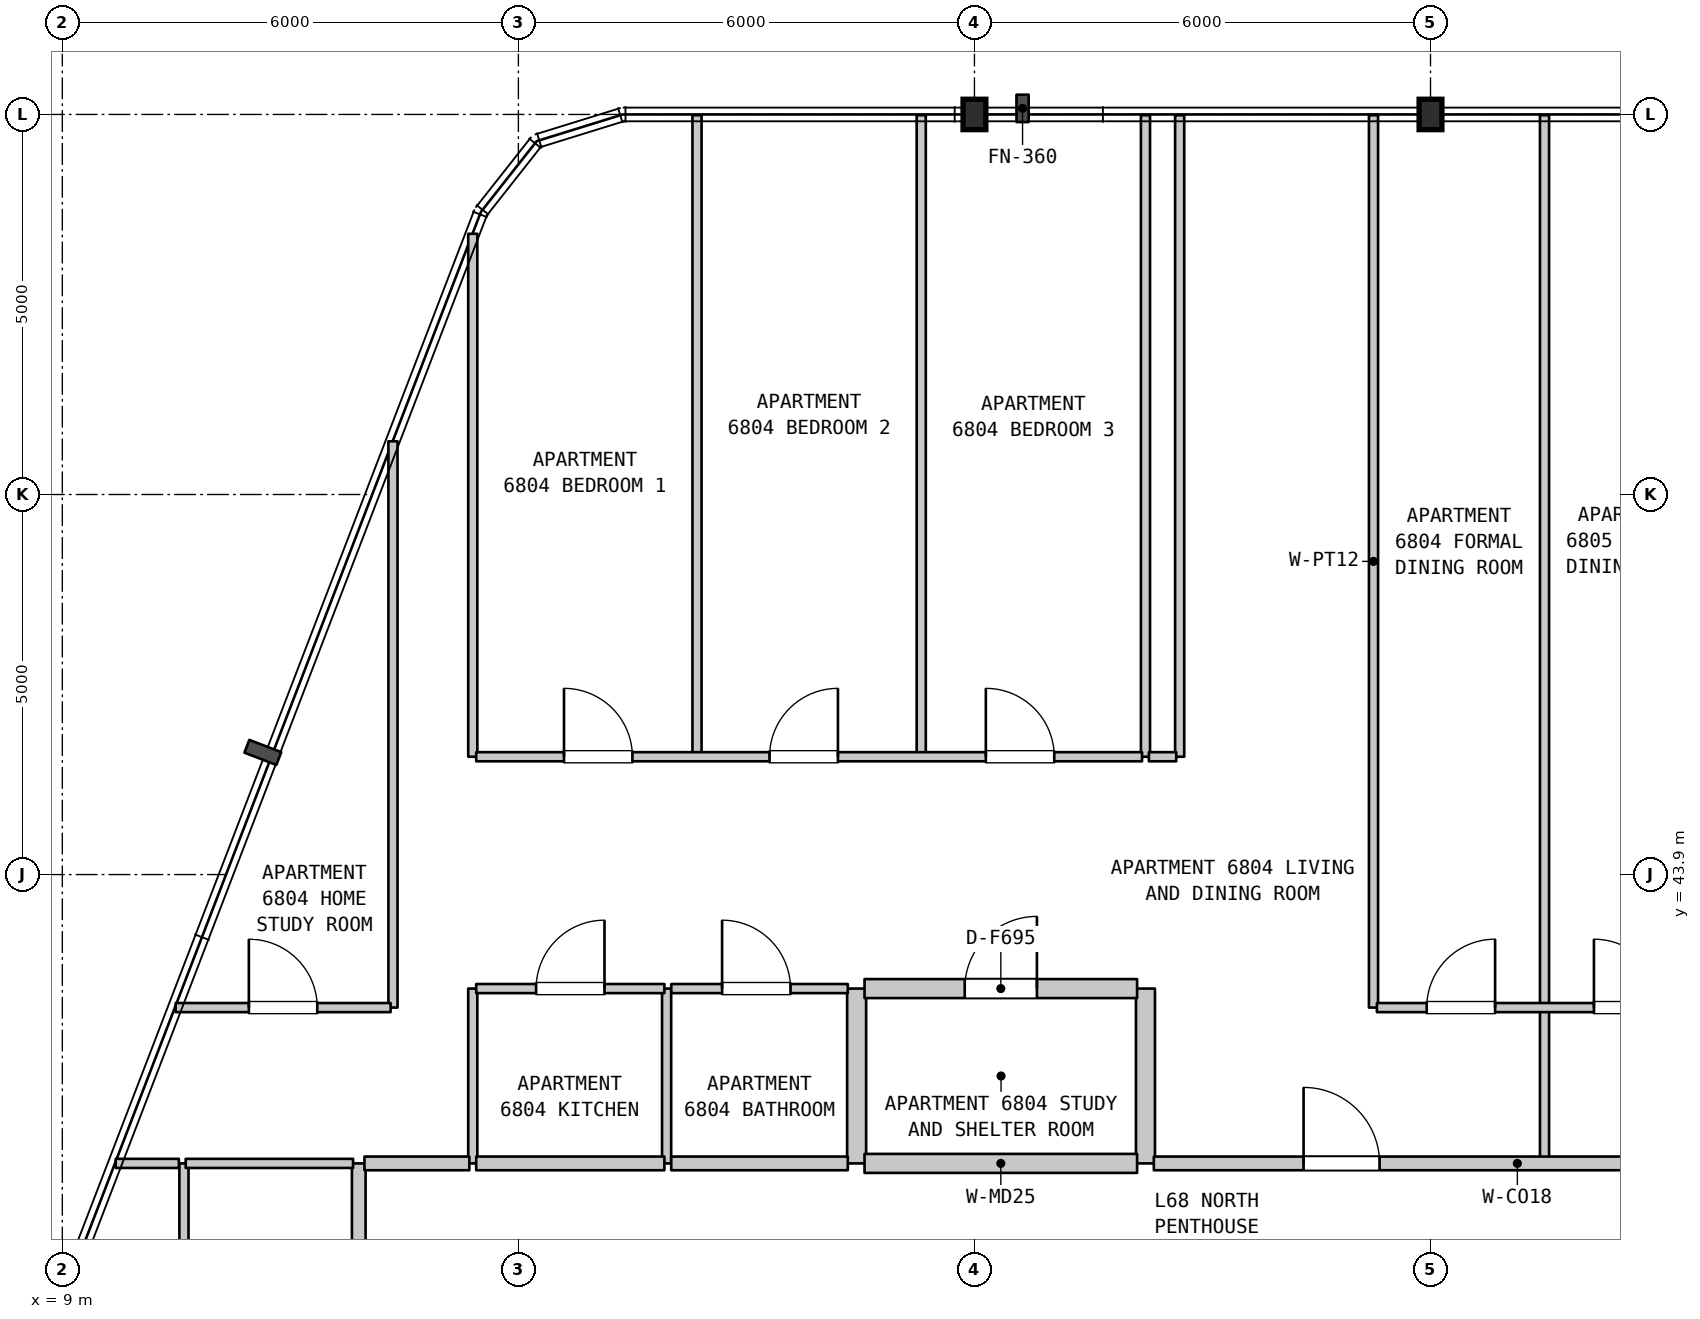
"""IFC4 building model, lengths in metres.
Left out: names, types, materials, properties, quantities, classifications, styles, units other than length and angle.
Written with IfcOpenShell. Run it as: python <this file> out.ifc"""

import sys

from ifc_helpers import new_model, si_unit, direction, frame, frame_2d, origin, origin_2d, place, context, subcontext, project, spatial, rectangle, i_section, extrude, element, fill, save


model = new_model("IFC4")
c1 = context("Model", 3, precision=1e-05, world=origin(), true_north=direction((0.0, 1.0)))
c2 = subcontext(c1, "Body", "Model", "MODEL_VIEW")
j1 = project(units=[si_unit("LENGTHUNIT", "METRE"), si_unit("PLANEANGLEUNIT", "RADIAN")], contexts=[c1])
p1 = place(None, origin())
s1 = spatial("IfcSite", under=j1, at=p1, CompositionType="ELEMENT")
p2 = place(p1, origin())
s2 = spatial("IfcBuilding", under=s1, at=p2, CompositionType="ELEMENT")
p3 = place(p2, frame((0.0, 0.0, 273.2)))
s3 = spatial("IfcBuildingStorey", under=s2, at=p3, CompositionType="ELEMENT", Elevation=273.2)
for number, where, z_axis, x_axis in (
    (1, (21.0, 53.9, 0.0), (0.0, 0.0, 1.0), (1.0, 0.0, 0.0)),
    (2, (27.0, 53.9, 0.0), (0.0, 0.0, 1.0), (1.0, 0.0, 0.0)),
):
    element("IfcColumn", number, at=place(p3, frame(where, z_axis=z_axis, x_axis=x_axis)), inside=s3, PredefinedType="COLUMN", context=c2, shape_type="SweptSolid", body=[
        extrude(i_section(OverallWidth=0.3, OverallDepth=0.4, WebThickness=0.013, FlangeThickness=0.024, FilletRadius=0.027, at=origin_2d()), origin(), (0.0, 0.0, 1.0), 3.7),
    ])
p4 = place(p3, frame((10.6, 33.32, 0.0), z_axis=(0.0, 0.0, 1.0), x_axis=(0.0, 1.0, 0.0)))
e3 = element("IfcWall", 3, at=p4, inside=s3, PredefinedType="PARTITIONING", context=c2, shape_type="SweptSolid", body=[
    extrude(rectangle(XDim=6.78, YDim=0.12, at=frame_2d((3.39, 0.0))), origin(), (0.0, 0.0, 1.0), 3.39),
])
p5 = place(p3, frame((12.9, 33.32, 0.0), z_axis=(0.0, 0.0, 1.0), x_axis=(0.0, 1.0, 0.0)))
e4 = element("IfcWall", 4, at=p5, inside=s3, PredefinedType="STANDARD", context=c2, shape_type="SweptSolid", body=[
    extrude(rectangle(XDim=6.78, YDim=0.18, at=frame_2d((3.39, 0.0))), origin(), (0.0, 0.0, 1.0), 3.39),
])
p6 = place(p3, frame((13.35, 42.15, 0.0), z_axis=(0.0, 0.0, 1.0), x_axis=(0.0, 1.0, 0.0)))
e5 = element("IfcWall", 5, at=p6, inside=s3, PredefinedType="PARTITIONING", context=c2, shape_type="SweptSolid", body=[
    extrude(rectangle(XDim=7.45, YDim=0.12, at=frame_2d((3.725, 0.0))), origin(), (0.0, 0.0, 1.0), 3.39),
])
p7 = place(p3, frame((14.4, 40.1, 0.0), z_axis=(0.0, 0.0, 1.0), x_axis=(0.0, 1.0, 0.0)))
e6 = element("IfcWall", 6, at=p7, inside=s3, PredefinedType="PARTITIONING", context=c2, shape_type="SweptSolid", body=[
    extrude(rectangle(XDim=2.3, YDim=0.12, at=frame_2d((1.15, 0.0))), origin(), (0.0, 0.0, 1.0), 3.39),
])
p8 = place(p3, frame((14.4, 45.45, 0.0), z_axis=(0.0, 0.0, 1.0), x_axis=(0.0, 1.0, 0.0)))
e7 = element("IfcWall", 7, at=p8, inside=s3, PredefinedType="PARTITIONING", context=c2, shape_type="SweptSolid", body=[
    extrude(rectangle(XDim=6.88, YDim=0.12, at=frame_2d((3.44, 0.0))), origin(), (0.0, 0.0, 1.0), 3.39),
])
p9 = place(p3, frame((16.95, 40.1, 0.0), z_axis=(0.0, 0.0, 1.0), x_axis=(0.0, 1.0, 0.0)))
e8 = element("IfcWall", 8, at=p9, inside=s3, PredefinedType="PARTITIONING", context=c2, shape_type="SweptSolid", body=[
    extrude(rectangle(XDim=2.3, YDim=0.12, at=frame_2d((1.15, 0.0))), origin(), (0.0, 0.0, 1.0), 3.39),
])
p10 = place(p3, frame((17.35, 45.45, 0.0), z_axis=(0.0, 0.0, 1.0), x_axis=(0.0, 1.0, 0.0)))
e9 = element("IfcWall", 9, at=p10, inside=s3, PredefinedType="PARTITIONING", context=c2, shape_type="SweptSolid", body=[
    extrude(rectangle(XDim=8.44, YDim=0.12, at=frame_2d((4.22, 0.0))), origin(), (0.0, 0.0, 1.0), 3.39),
])
p11 = place(p3, frame((19.45, 40.1, 0.0), z_axis=(0.0, 0.0, 1.0), x_axis=(0.0, 1.0, 0.0)))
e10 = element("IfcWall", 10, at=p11, inside=s3, PredefinedType="STANDARD", context=c2, shape_type="SweptSolid", body=[
    extrude(rectangle(XDim=2.3, YDim=0.25, at=frame_2d((1.15, 0.0))), origin(), (0.0, 0.0, 1.0), 3.39),
])
p12 = place(p3, frame((20.3, 45.45, 0.0), z_axis=(0.0, 0.0, 1.0), x_axis=(0.0, 1.0, 0.0)))
e11 = element("IfcWall", 11, at=p12, inside=s3, PredefinedType="PARTITIONING", context=c2, shape_type="SweptSolid", body=[
    extrude(rectangle(XDim=8.44, YDim=0.12, at=frame_2d((4.22, 0.0))), origin(), (0.0, 0.0, 1.0), 3.39),
])
p13 = place(p3, frame((23.25, 40.1, 0.0), z_axis=(0.0, 0.0, 1.0), x_axis=(0.0, 1.0, 0.0)))
e12 = element("IfcWall", 12, at=p13, inside=s3, PredefinedType="STANDARD", context=c2, shape_type="SweptSolid", body=[
    extrude(rectangle(XDim=2.3, YDim=0.25, at=frame_2d((1.15, 0.0))), origin(), (0.0, 0.0, 1.0), 3.39),
])
for number, where, z_axis, x_axis in (
    (13, (23.25, 45.45, 0.0), (0.0, 0.0, 1.0), (0.0, 1.0, 0.0)),
    (14, (23.7, 45.45, 0.0), (0.0, 0.0, 1.0), (0.0, 1.0, 0.0)),
):
    element("IfcWall", number, at=place(p3, frame(where, z_axis=z_axis, x_axis=x_axis)), inside=s3, PredefinedType="PARTITIONING", context=c2, shape_type="SweptSolid", body=[
        extrude(rectangle(XDim=8.44, YDim=0.12, at=frame_2d((4.22, 0.0))), origin(), (0.0, 0.0, 1.0), 3.39),
    ])
p14 = place(p3, frame((26.25, 42.15, 0.0), z_axis=(0.0, 0.0, 1.0), x_axis=(0.0, 1.0, 0.0)))
e15 = element("IfcWall", 15, at=p14, inside=s3, PredefinedType="PARTITIONING", context=c2, shape_type="SweptSolid", body=[
    extrude(rectangle(XDim=11.74, YDim=0.12, at=frame_2d((5.87, 0.0))), origin(), (0.0, 0.0, 1.0), 3.39),
])
p15 = place(p3, frame((28.5, 40.1, 0.0), z_axis=(0.0, 0.0, 1.0), x_axis=(0.0, 1.0, 0.0)))
e16 = element("IfcWall", 16, at=p15, inside=s3, PredefinedType="PARTITIONING", context=c2, shape_type="SweptSolid", body=[
    extrude(rectangle(XDim=2.05, YDim=0.12, at=frame_2d((1.025, 0.0))), origin(), (0.0, 0.0, 1.0), 3.39),
])
p16 = place(p3, frame((28.5, 42.15, 0.0), z_axis=(0.0, 0.0, 1.0), x_axis=(0.0, 1.0, 0.0)))
e17 = element("IfcWall", 17, at=p16, inside=s3, PredefinedType="PARTITIONING", context=c2, shape_type="SweptSolid", body=[
    extrude(rectangle(XDim=11.74, YDim=0.12, at=frame_2d((5.87, 0.0))), origin(), (0.0, 0.0, 1.0), 3.39),
])
p17 = place(p3, frame((9.702, 40.1, 0.0), z_axis=(0.0, 0.0, 1.0), x_axis=(1.0, 0.0, 0.0)))
e18 = element("IfcWall", 18, at=p17, inside=s3, PredefinedType="PARTITIONING", context=c2, shape_type="SweptSolid", body=[
    extrude(rectangle(XDim=0.831, YDim=0.12, at=frame_2d((0.416, 0.0))), origin(), (0.0, 0.0, 1.0), 3.39),
])
p18 = place(p3, frame((10.623, 40.1, 0.0), z_axis=(0.0, 0.0, 1.0), x_axis=(1.0, 0.0, 0.0)))
e19 = element("IfcWall", 19, at=p18, inside=s3, PredefinedType="PARTITIONING", context=c2, shape_type="SweptSolid", body=[
    extrude(rectangle(XDim=2.202, YDim=0.12, at=frame_2d((1.101, 0.0))), origin(), (0.0, 0.0, 1.0), 3.39),
])
p19 = place(p3, frame((12.975, 40.1, 0.0), z_axis=(0.0, 0.0, 1.0), x_axis=(1.0, 0.0, 0.0)))
e20 = element("IfcWall", 20, at=p19, inside=s3, PredefinedType="STANDARD", context=c2, shape_type="SweptSolid", body=[
    extrude(rectangle(XDim=1.38, YDim=0.18, at=frame_2d((0.69, 0.0))), origin(), (0.0, 0.0, 1.0), 3.39),
])
p20 = place(p3, frame((14.445, 40.1, 0.0), z_axis=(0.0, 0.0, 1.0), x_axis=(1.0, 0.0, 0.0)))
e21 = element("IfcWall", 21, at=p20, inside=s3, PredefinedType="STANDARD", context=c2, shape_type="SweptSolid", body=[
    extrude(rectangle(XDim=2.476, YDim=0.18, at=frame_2d((1.238, 0.0))), origin(), (0.0, 0.0, 1.0), 3.39),
])
p21 = place(p3, frame((17.011, 40.1, 0.0), z_axis=(0.0, 0.0, 1.0), x_axis=(1.0, 0.0, 0.0)))
e22 = element("IfcWall", 22, at=p21, inside=s3, PredefinedType="STANDARD", context=c2, shape_type="SweptSolid", body=[
    extrude(rectangle(XDim=2.323, YDim=0.18, at=frame_2d((1.162, 0.0))), origin(), (0.0, 0.0, 1.0), 3.39),
])
p22 = place(p3, frame((19.554, 40.1, 0.0), z_axis=(0.0, 0.0, 1.0), x_axis=(1.0, 0.0, 0.0)))
e23 = element("IfcWall", 23, at=p22, inside=s3, PredefinedType="STANDARD", context=c2, shape_type="SweptSolid", body=[
    extrude(rectangle(XDim=3.586, YDim=0.25, at=frame_2d((1.793, 0.0))), origin(), (0.0, 0.0, 1.0), 3.39),
])
p23 = place(p3, frame((23.36, 40.1, 0.0), z_axis=(0.0, 0.0, 1.0), x_axis=(1.0, 0.0, 0.0)))
e24 = element("IfcWall", 24, at=p23, inside=s3, PredefinedType="STANDARD", context=c2, shape_type="SweptSolid", body=[
    extrude(rectangle(XDim=9.565, YDim=0.18, at=frame_2d((4.782, 0.0))), origin(), (0.0, 0.0, 1.0), 3.39),
])
p24 = place(p23, frame((1.97, 0.0, 0.0)))
e25 = element("IfcOpeningElement", 25, at=p24, cuts=e24, PredefinedType="OPENING", context=c2, shape_type="SweptSolid", body=[
    extrude(rectangle(XDim=1.0, YDim=2.15, at=frame_2d((0.5, 1.075))), frame((0.0, 0.1, 0.0), z_axis=(0.0, -1.0, 0.0), x_axis=(1.0, 0.0, 0.0)), (0.0, 0.0, 1.0), 0.2),
])
p25 = place(p23, frame((6.793, 0.0, 0.0)))
e26 = element("IfcOpeningElement", 26, at=p25, cuts=e24, PredefinedType="OPENING", context=c2, shape_type="SweptSolid", body=[
    extrude(rectangle(XDim=1.0, YDim=2.15, at=frame_2d((0.5, 1.075))), frame((0.0, 0.1, 0.0), z_axis=(0.0, -1.0, 0.0), x_axis=(1.0, 0.0, 0.0)), (0.0, 0.0, 1.0), 0.2),
])
p26 = place(p3, frame((10.491, 42.15, 0.0), z_axis=(0.0, 0.0, 1.0), x_axis=(1.0, 0.0, 0.0)))
e27 = element("IfcWall", 27, at=p26, inside=s3, PredefinedType="PARTITIONING", context=c2, shape_type="SweptSolid", body=[
    extrude(rectangle(XDim=2.828, YDim=0.12, at=frame_2d((1.414, 0.0))), origin(), (0.0, 0.0, 1.0), 3.39),
])
p27 = place(p26, frame((0.963, 0.0, 0.0)))
e28 = element("IfcOpeningElement", 28, at=p27, cuts=e27, PredefinedType="OPENING", context=c2, shape_type="SweptSolid", body=[
    extrude(rectangle(XDim=0.9, YDim=2.15, at=frame_2d((0.45, 1.075))), frame((0.0, 0.07, 0.0), z_axis=(0.0, -1.0, 0.0), x_axis=(1.0, 0.0, 0.0)), (0.0, 0.0, 1.0), 0.14),
])
p28 = place(p3, frame((26.295, 42.15, 0.0), z_axis=(0.0, 0.0, 1.0), x_axis=(1.0, 0.0, 0.0)))
e29 = element("IfcWall", 29, at=p28, inside=s3, PredefinedType="PARTITIONING", context=c2, shape_type="SweptSolid", body=[
    extrude(rectangle(XDim=4.41, YDim=0.12, at=frame_2d((2.205, 0.0))), origin(), (0.0, 0.0, 1.0), 3.39),
])
p29 = place(p28, frame((0.655, 0.0, 0.0)))
e30 = element("IfcOpeningElement", 30, at=p29, cuts=e29, PredefinedType="OPENING", context=c2, shape_type="SweptSolid", body=[
    extrude(rectangle(XDim=0.9, YDim=2.15, at=frame_2d((0.45, 1.075))), frame((0.0, 0.07, 0.0), z_axis=(0.0, -1.0, 0.0), x_axis=(1.0, 0.0, 0.0)), (0.0, 0.0, 1.0), 0.14),
])
p30 = place(p28, frame((2.855, 0.0, 0.0)))
e31 = element("IfcOpeningElement", 31, at=p30, cuts=e29, PredefinedType="OPENING", context=c2, shape_type="SweptSolid", body=[
    extrude(rectangle(XDim=0.9, YDim=2.15, at=frame_2d((0.45, 1.075))), frame((0.0, 0.07, 0.0), z_axis=(0.0, -1.0, 0.0), x_axis=(1.0, 0.0, 0.0)), (0.0, 0.0, 1.0), 0.14),
])
p31 = place(p3, frame((14.445, 42.4, 0.0), z_axis=(0.0, 0.0, 1.0), x_axis=(1.0, 0.0, 0.0)))
e32 = element("IfcWall", 32, at=p31, inside=s3, PredefinedType="PARTITIONING", context=c2, shape_type="SweptSolid", body=[
    extrude(rectangle(XDim=2.476, YDim=0.12, at=frame_2d((1.238, 0.0))), origin(), (0.0, 0.0, 1.0), 3.39),
])
p32 = place(p31, frame((0.788, 0.0, 0.0)))
e33 = element("IfcOpeningElement", 33, at=p32, cuts=e32, PredefinedType="OPENING", context=c2, shape_type="SweptSolid", body=[
    extrude(rectangle(XDim=0.9, YDim=2.15, at=frame_2d((0.45, 1.075))), frame((0.0, 0.07, 0.0), z_axis=(0.0, -1.0, 0.0), x_axis=(1.0, 0.0, 0.0)), (0.0, 0.0, 1.0), 0.14),
])
p33 = place(p3, frame((17.011, 42.4, 0.0), z_axis=(0.0, 0.0, 1.0), x_axis=(1.0, 0.0, 0.0)))
e34 = element("IfcWall", 34, at=p33, inside=s3, PredefinedType="PARTITIONING", context=c2, shape_type="SweptSolid", body=[
    extrude(rectangle(XDim=2.323, YDim=0.12, at=frame_2d((1.162, 0.0))), origin(), (0.0, 0.0, 1.0), 3.39),
])
p34 = place(p33, frame((0.669, 0.0, 0.0)))
e35 = element("IfcOpeningElement", 35, at=p34, cuts=e34, PredefinedType="OPENING", context=c2, shape_type="SweptSolid", body=[
    extrude(rectangle(XDim=0.9, YDim=2.1, at=frame_2d((0.45, 1.05))), frame((0.0, 0.07, 0.0), z_axis=(0.0, -1.0, 0.0), x_axis=(1.0, 0.0, 0.0)), (0.0, 0.0, 1.0), 0.14),
])
p35 = place(p3, frame((19.554, 42.4, 0.0), z_axis=(0.0, 0.0, 1.0), x_axis=(1.0, 0.0, 0.0)))
e36 = element("IfcWall", 36, at=p35, inside=s3, PredefinedType="STANDARD", context=c2, shape_type="SweptSolid", body=[
    extrude(rectangle(XDim=3.586, YDim=0.25, at=frame_2d((1.793, 0.0))), origin(), (0.0, 0.0, 1.0), 3.39),
])
p36 = place(p35, frame((1.318, 0.0, 0.0)))
e37 = element("IfcOpeningElement", 37, at=p36, cuts=e36, PredefinedType="OPENING", context=c2, shape_type="SweptSolid", body=[
    extrude(rectangle(XDim=0.95, YDim=2.15, at=frame_2d((0.475, 1.075))), frame((0.0, 0.135, 0.0), z_axis=(0.0, -1.0, 0.0), x_axis=(1.0, 0.0, 0.0)), (0.0, 0.0, 1.0), 0.27),
])
p37 = place(p3, frame((14.445, 45.45, 0.0), z_axis=(0.0, 0.0, 1.0), x_axis=(1.0, 0.0, 0.0)))
e38 = element("IfcWall", 38, at=p37, inside=s3, PredefinedType="PARTITIONING", context=c2, shape_type="SweptSolid", body=[
    extrude(rectangle(XDim=8.76, YDim=0.12, at=frame_2d((4.38, 0.0))), origin(), (0.0, 0.0, 1.0), 3.39),
])
p38 = place(p37, frame((1.155, 0.0, 0.0)))
e39 = element("IfcOpeningElement", 39, at=p38, cuts=e38, PredefinedType="OPENING", context=c2, shape_type="SweptSolid", body=[
    extrude(rectangle(XDim=0.9, YDim=2.15, at=frame_2d((0.45, 1.075))), frame((0.0, 0.07, 0.0), z_axis=(0.0, -1.0, 0.0), x_axis=(1.0, 0.0, 0.0)), (0.0, 0.0, 1.0), 0.14),
])
p39 = place(p37, frame((3.859, 0.0, 0.0)))
e40 = element("IfcOpeningElement", 40, at=p39, cuts=e38, PredefinedType="OPENING", context=c2, shape_type="SweptSolid", body=[
    extrude(rectangle(XDim=0.9, YDim=2.15, at=frame_2d((0.45, 1.075))), frame((0.0, 0.07, 0.0), z_axis=(0.0, -1.0, 0.0), x_axis=(1.0, 0.0, 0.0)), (0.0, 0.0, 1.0), 0.14),
])
p40 = place(p37, frame((6.705, 0.0, 0.0)))
e41 = element("IfcOpeningElement", 41, at=p40, cuts=e38, PredefinedType="OPENING", context=c2, shape_type="SweptSolid", body=[
    extrude(rectangle(XDim=0.9, YDim=2.15, at=frame_2d((0.45, 1.075))), frame((0.0, 0.07, 0.0), z_axis=(0.0, -1.0, 0.0), x_axis=(1.0, 0.0, 0.0)), (0.0, 0.0, 1.0), 0.14),
])
p41 = place(p3, frame((23.295, 45.45, 0.0), z_axis=(0.0, 0.0, 1.0), x_axis=(1.0, 0.0, 0.0)))
e42 = element("IfcWall", 42, at=p41, inside=s3, PredefinedType="PARTITIONING", context=c2, shape_type="SweptSolid", body=[
    extrude(rectangle(XDim=0.36, YDim=0.12, at=frame_2d((0.18, 0.0))), origin(), (0.0, 0.0, 1.0), 3.39),
])
p42 = place(p24, origin())
e43 = element("IfcDoor", 43, at=p42, inside=s3, OperationType="SINGLE_SWING_LEFT", PredefinedType="DOOR", context=c2, shape_type="SweptSolid", body=[
    extrude(rectangle(XDim=1.0, YDim=2.15, at=frame_2d((0.5, 1.075))), frame((0.0, 0.025, 0.0), z_axis=(0.0, -1.0, 0.0), x_axis=(1.0, 0.0, 0.0)), (0.0, 0.0, 1.0), 0.05),
])
fill(e25, e43)
p43 = place(p27, origin())
e44 = element("IfcDoor", 44, at=p43, inside=s3, OperationType="SINGLE_SWING_LEFT", PredefinedType="DOOR", context=c2, shape_type="SweptSolid", body=[
    extrude(rectangle(XDim=0.9, YDim=2.15, at=frame_2d((0.45, 1.075))), frame((0.0, 0.025, 0.0), z_axis=(0.0, -1.0, 0.0), x_axis=(1.0, 0.0, 0.0)), (0.0, 0.0, 1.0), 0.05),
])
fill(e28, e44)
p44 = place(p29, origin())
e45 = element("IfcDoor", 45, at=p44, inside=s3, OperationType="SINGLE_SWING_RIGHT", PredefinedType="DOOR", context=c2, shape_type="SweptSolid", body=[
    extrude(rectangle(XDim=0.9, YDim=2.15, at=frame_2d((0.45, 1.075))), frame((0.0, 0.025, 0.0), z_axis=(0.0, -1.0, 0.0), x_axis=(1.0, 0.0, 0.0)), (0.0, 0.0, 1.0), 0.05),
])
fill(e30, e45)
p45 = place(p30, origin())
e46 = element("IfcDoor", 46, at=p45, inside=s3, OperationType="SINGLE_SWING_LEFT", PredefinedType="DOOR", context=c2, shape_type="SweptSolid", body=[
    extrude(rectangle(XDim=0.9, YDim=2.15, at=frame_2d((0.45, 1.075))), frame((0.0, 0.025, 0.0), z_axis=(0.0, -1.0, 0.0), x_axis=(1.0, 0.0, 0.0)), (0.0, 0.0, 1.0), 0.05),
])
fill(e31, e46)
p46 = place(p32, origin())
e47 = element("IfcDoor", 47, at=p46, inside=s3, OperationType="SINGLE_SWING_RIGHT", PredefinedType="DOOR", context=c2, shape_type="SweptSolid", body=[
    extrude(rectangle(XDim=0.9, YDim=2.15, at=frame_2d((0.45, 1.075))), frame((0.0, 0.025, 0.0), z_axis=(0.0, -1.0, 0.0), x_axis=(1.0, 0.0, 0.0)), (0.0, 0.0, 1.0), 0.05),
])
fill(e33, e47)
p47 = place(p34, origin())
e48 = element("IfcDoor", 48, at=p47, inside=s3, OperationType="SINGLE_SWING_LEFT", PredefinedType="DOOR", context=c2, shape_type="SweptSolid", body=[
    extrude(rectangle(XDim=0.9, YDim=2.1, at=frame_2d((0.45, 1.05))), frame((0.0, 0.025, 0.0), z_axis=(0.0, -1.0, 0.0), x_axis=(1.0, 0.0, 0.0)), (0.0, 0.0, 1.0), 0.05),
])
fill(e35, e48)
p48 = place(p36, origin())
e49 = element("IfcDoor", 49, at=p48, inside=s3, OperationType="SINGLE_SWING_RIGHT", PredefinedType="DOOR", context=c2, shape_type="SweptSolid", body=[
    extrude(rectangle(XDim=0.95, YDim=2.15, at=frame_2d((0.475, 1.075))), frame((0.0, 0.025, 0.0), z_axis=(0.0, -1.0, 0.0), x_axis=(1.0, 0.0, 0.0)), (0.0, 0.0, 1.0), 0.05),
])
fill(e37, e49)
p49 = place(p38, origin())
e50 = element("IfcDoor", 50, at=p49, inside=s3, OperationType="SINGLE_SWING_LEFT", PredefinedType="DOOR", context=c2, shape_type="SweptSolid", body=[
    extrude(rectangle(XDim=0.9, YDim=2.15, at=frame_2d((0.45, 1.075))), frame((0.0, 0.025, 0.0), z_axis=(0.0, -1.0, 0.0), x_axis=(1.0, 0.0, 0.0)), (0.0, 0.0, 1.0), 0.05),
])
fill(e39, e50)
p50 = place(p39, origin())
e51 = element("IfcDoor", 51, at=p50, inside=s3, OperationType="SINGLE_SWING_RIGHT", PredefinedType="DOOR", context=c2, shape_type="SweptSolid", body=[
    extrude(rectangle(XDim=0.9, YDim=2.15, at=frame_2d((0.45, 1.075))), frame((0.0, 0.025, 0.0), z_axis=(0.0, -1.0, 0.0), x_axis=(1.0, 0.0, 0.0)), (0.0, 0.0, 1.0), 0.05),
])
fill(e40, e51)
p51 = place(p40, origin())
e52 = element("IfcDoor", 52, at=p51, inside=s3, OperationType="SINGLE_SWING_LEFT", PredefinedType="DOOR", context=c2, shape_type="SweptSolid", body=[
    extrude(rectangle(XDim=0.9, YDim=2.15, at=frame_2d((0.45, 1.075))), frame((0.0, 0.025, 0.0), z_axis=(0.0, -1.0, 0.0), x_axis=(1.0, 0.0, 0.0)), (0.0, 0.0, 1.0), 0.05),
])
fill(e41, e52)
save(model, sys.argv[1])
